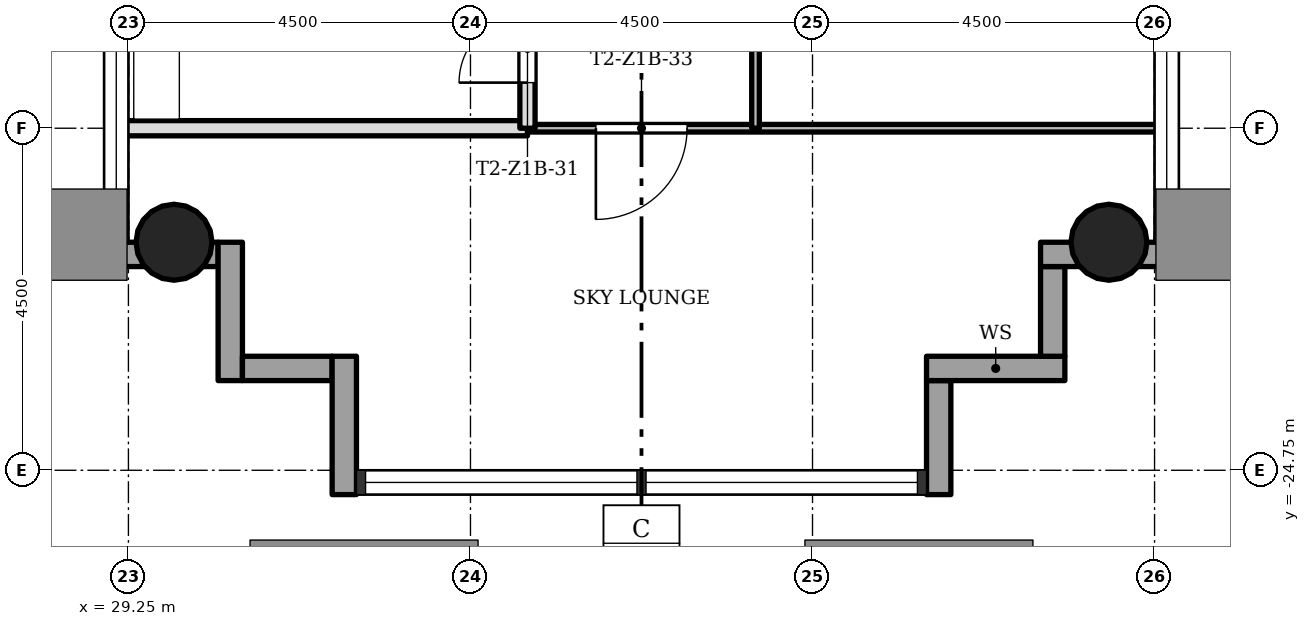
"""IFC4 building model, lengths in metres.
Left out: names, types, materials, properties, quantities, classifications, styles, units other than length and angle.
Written with IfcOpenShell. Run it as: python <this file> out.ifc"""

import sys

from ifc_helpers import new_model, si_unit, direction, frame, frame_2d, origin, origin_2d, place, context, subcontext, project, spatial, rectangle, hollow_circle, extrude, element, fill, save


model = new_model("IFC4")
c1 = context("Model", 3, precision=1e-05, world=origin(), true_north=direction((0.0, 1.0)))
c2 = subcontext(c1, "Body", "Model", "MODEL_VIEW")
j1 = project(units=[si_unit("LENGTHUNIT", "METRE"), si_unit("PLANEANGLEUNIT", "RADIAN")], contexts=[c1])
p1 = place(None, origin())
s1 = spatial("IfcSite", under=j1, at=p1, CompositionType="ELEMENT")
p2 = place(p1, origin())
s2 = spatial("IfcBuilding", under=s1, at=p2, CompositionType="ELEMENT")
p3 = place(p2, frame((0.0, 0.0, 38.1)))
s3 = spatial("IfcBuildingStorey", under=s2, at=p3, CompositionType="ELEMENT", Elevation=38.1)
for number, where, z_axis, x_axis in (
    (1, (42.15, -21.75, 0.0), (0.0, 0.0, 1.0), (1.0, 0.0, 0.0)),
    (2, (29.85, -21.75, 0.0), (0.0, 0.0, 1.0), (1.0, 0.0, 0.0)),
):
    element("IfcColumn", number, at=place(p3, frame(where, z_axis=z_axis, x_axis=x_axis)), inside=s3, PredefinedType="COLUMN", context=c2, shape_type="SweptSolid", body=[
        extrude(hollow_circle(Radius=0.5, WallThickness=0.036, at=origin_2d()), origin(), (0.0, 0.0, 1.0), 3.4),
    ])
p4 = place(p3, frame((39.91, -25.07, -0.3), z_axis=(0.0, 0.0, 1.0), x_axis=(0.0, 1.0, 0.0)))
e3 = element("IfcWall", 3, at=p4, inside=s3, PredefinedType="STANDARD", context=c2, shape_type="SweptSolid", body=[
    extrude(rectangle(XDim=1.5, YDim=0.32, at=frame_2d((0.75, 0.0))), origin(), (0.0, 0.0, 1.0), 3.4),
])
p5 = place(p3, frame((39.75, -23.41, -0.3), z_axis=(0.0, 0.0, 1.0), x_axis=(1.0, 0.0, 0.0)))
e4 = element("IfcWall", 4, at=p5, inside=s3, PredefinedType="STANDARD", context=c2, shape_type="SweptSolid", body=[
    extrude(rectangle(XDim=1.82, YDim=0.32, at=frame_2d((0.91, 0.0))), origin(), (0.0, 0.0, 1.0), 3.4),
])
p6 = place(p3, frame((41.41, -23.25, -0.3), z_axis=(0.0, 0.0, 1.0), x_axis=(0.0, 1.0, 0.0)))
e5 = element("IfcWall", 5, at=p6, inside=s3, PredefinedType="STANDARD", context=c2, shape_type="SweptSolid", body=[
    extrude(rectangle(XDim=1.18, YDim=0.32, at=frame_2d((0.59, 0.0))), origin(), (0.0, 0.0, 1.0), 3.4),
])
p7 = place(p3, frame((41.25, -21.91, -0.3), z_axis=(0.0, 0.0, 1.0), x_axis=(1.0, 0.0, 0.0)))
e6 = element("IfcWall", 6, at=p7, inside=s3, PredefinedType="STANDARD", context=c2, shape_type="SweptSolid", body=[
    extrude(rectangle(XDim=1.82, YDim=0.32, at=frame_2d((0.91, 0.0))), origin(), (0.0, 0.0, 1.0), 3.4),
])
p8 = place(p3, frame((28.93, -21.91, -0.3), z_axis=(0.0, 0.0, 1.0), x_axis=(1.0, 0.0, 0.0)))
e7 = element("IfcWall", 7, at=p8, inside=s3, PredefinedType="STANDARD", context=c2, shape_type="SweptSolid", body=[
    extrude(rectangle(XDim=1.5, YDim=0.32, at=frame_2d((0.75, 0.0))), origin(), (0.0, 0.0, 1.0), 3.4),
])
p9 = place(p3, frame((30.59, -21.75, -0.3), z_axis=(0.0, 0.0, 1.0), x_axis=(0.0, -1.0, 0.0)))
e8 = element("IfcWall", 8, at=p9, inside=s3, PredefinedType="STANDARD", context=c2, shape_type="SweptSolid", body=[
    extrude(rectangle(XDim=1.82, YDim=0.32, at=frame_2d((0.91, 0.0))), origin(), (0.0, 0.0, 1.0), 3.4),
])
p10 = place(p3, frame((30.75, -23.41, -0.3), z_axis=(0.0, 0.0, 1.0), x_axis=(1.0, 0.0, 0.0)))
e9 = element("IfcWall", 9, at=p10, inside=s3, PredefinedType="STANDARD", context=c2, shape_type="SweptSolid", body=[
    extrude(rectangle(XDim=1.18, YDim=0.32, at=frame_2d((0.59, 0.0))), origin(), (0.0, 0.0, 1.0), 3.4),
])
p11 = place(p3, frame((32.09, -23.25, -0.3), z_axis=(0.0, 0.0, 1.0), x_axis=(0.0, -1.0, 0.0)))
e10 = element("IfcWall", 10, at=p11, inside=s3, PredefinedType="STANDARD", context=c2, shape_type="SweptSolid", body=[
    extrude(rectangle(XDim=1.82, YDim=0.32, at=frame_2d((0.91, 0.0))), origin(), (0.0, 0.0, 1.0), 3.4),
])
p12 = place(p3, frame((42.85, -20.25, 0.0), z_axis=(0.0, 0.0, 1.0), x_axis=(-1.0, 0.0, 0.0)))
e11 = element("IfcWall", 11, at=p12, inside=s3, PredefinedType="PARTITIONING", context=c2, shape_type="SweptSolid", body=[
    extrude(rectangle(XDim=8.35, YDim=0.1, at=frame_2d((4.175, 0.0))), origin(), (0.0, 0.0, 1.0), 3.0),
])
p13 = place(p12, frame((6.25, 0.0, 0.0)))
e12 = element("IfcOpeningElement", 12, at=p13, cuts=e11, PredefinedType="OPENING", context=c2, shape_type="SweptSolid", body=[
    extrude(rectangle(XDim=1.2, YDim=2.1, at=frame_2d((0.6, 1.05))), frame((0.0, 0.06, 0.0), z_axis=(0.0, -1.0, 0.0), x_axis=(1.0, 0.0, 0.0)), (0.0, 0.0, 1.0), 0.12),
])
p14 = place(p3, frame((34.5, -20.25, 0.0), z_axis=(0.0, 0.0, 1.0), x_axis=(-1.0, 0.0, 0.0)))
e13 = element("IfcWall", 13, at=p14, inside=s3, PredefinedType="SOLIDWALL", context=c2, shape_type="SweptSolid", body=[
    extrude(rectangle(XDim=5.35, YDim=0.2, at=frame_2d((2.675, 0.0))), origin(), (0.0, 0.0, 1.0), 3.0),
])
p15 = place(p3, frame((37.5, -20.25, 0.0), z_axis=(0.0, 0.0, 1.0), x_axis=(0.0, 1.0, 0.0)))
e14 = element("IfcWall", 14, at=p15, inside=s3, PredefinedType="PARTITIONING", context=c2, shape_type="SweptSolid", body=[
    extrude(rectangle(XDim=4.5, YDim=0.1, at=frame_2d((2.25, 0.0))), origin(), (0.0, 0.0, 1.0), 3.0),
])
p16 = place(p15, frame((1.8, 0.0, 0.0)))
e15 = element("IfcOpeningElement", 15, at=p16, cuts=e14, PredefinedType="OPENING", context=c2, shape_type="SweptSolid", body=[
    extrude(rectangle(XDim=0.9, YDim=2.1, at=frame_2d((0.45, 1.05))), frame((0.0, 0.06, 0.0), z_axis=(0.0, -1.0, 0.0), x_axis=(1.0, 0.0, 0.0)), (0.0, 0.0, 1.0), 0.12),
])
p17 = place(p3, frame((34.5, -20.25, 0.0), z_axis=(0.0, 0.0, 1.0), x_axis=(0.0, 1.0, 0.0)))
e16 = element("IfcWall", 16, at=p17, inside=s3, PredefinedType="SOLIDWALL", context=c2, shape_type="SweptSolid", body=[
    extrude(rectangle(XDim=4.5, YDim=0.2, at=frame_2d((2.25, 0.0))), origin(), (0.0, 0.0, 1.0), 3.0),
])
p18 = place(p17, frame((0.6, 0.0, 0.0)))
e17 = element("IfcOpeningElement", 17, at=p18, cuts=e16, PredefinedType="OPENING", context=c2, shape_type="SweptSolid", body=[
    extrude(rectangle(XDim=0.9, YDim=2.1, at=frame_2d((0.45, 1.05))), frame((0.0, 0.11, 0.0), z_axis=(0.0, -1.0, 0.0), x_axis=(1.0, 0.0, 0.0)), (0.0, 0.0, 1.0), 0.22),
])
p19 = place(p18, origin())
e18 = element("IfcDoor", 18, at=p19, inside=s3, OperationType="SINGLE_SWING_RIGHT", PredefinedType="DOOR", context=c2, shape_type="SweptSolid", body=[
    extrude(rectangle(XDim=0.9, YDim=2.1, at=frame_2d((0.45, 1.05))), frame((0.0, 0.025, 0.0), z_axis=(0.0, -1.0, 0.0), x_axis=(1.0, 0.0, 0.0)), (0.0, 0.0, 1.0), 0.05),
])
fill(e17, e18)
p20 = place(p13, origin())
e19 = element("IfcDoor", 19, at=p20, inside=s3, OperationType="SINGLE_SWING_LEFT", PredefinedType="DOOR", context=c2, shape_type="SweptSolid", body=[
    extrude(rectangle(XDim=1.2, YDim=2.1, at=frame_2d((0.6, 1.05))), frame((0.0, 0.025, 0.0), z_axis=(0.0, -1.0, 0.0), x_axis=(1.0, 0.0, 0.0)), (0.0, 0.0, 1.0), 0.05),
])
fill(e12, e19)
save(model, sys.argv[1])
